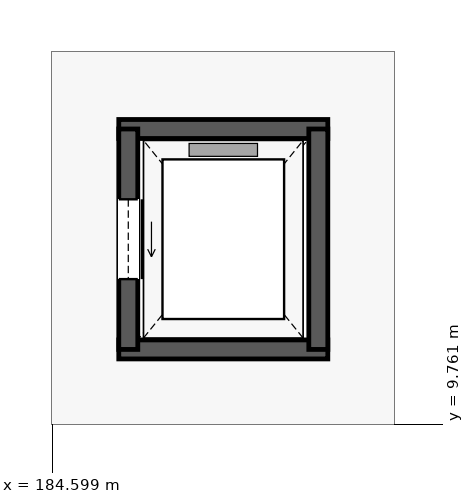
"""IFC4 building model, lengths in metres.
Left out: names, types, materials, properties, quantities, classifications, styles, units other than length and angle.
Written with IfcOpenShell. Run it as: python <this file> out.ifc"""

import sys

from ifc_helpers import new_model, si_unit, direction, frame, frame_2d, origin, place, context, subcontext, project, spatial, rectangle, extrude, element, fill, save


model = new_model("IFC4")
c1 = context("Model", 3, precision=1e-05, world=origin(), true_north=direction((0.0, 1.0)))
c2 = subcontext(c1, "Body", "Model", "MODEL_VIEW")
j1 = project(units=[si_unit("LENGTHUNIT", "METRE"), si_unit("PLANEANGLEUNIT", "RADIAN")], contexts=[c1])
p1 = place(None, origin())
s1 = spatial("IfcSite", under=j1, at=p1, CompositionType="ELEMENT")
p2 = place(p1, origin())
s2 = spatial("IfcBuilding", under=s1, at=p2, CompositionType="ELEMENT")
p3 = place(p2, frame((0.0, 0.0, 19.8)))
s3 = spatial("IfcBuildingStorey", under=s2, at=p3, CompositionType="ELEMENT", Elevation=19.8)
for number, where, z_axis, x_axis in (
    (1, (185.475, 10.75, 0.0), (0.0, 0.0, 1.0), (1.0, 0.0, 0.0)),
    (2, (188.225, 13.65, 0.0), (0.0, 0.0, 1.0), (-1.0, 0.0, 0.0)),
):
    element("IfcWall", number, at=place(p3, frame(where, z_axis=z_axis, x_axis=x_axis)), inside=s3, PredefinedType="SHEAR", context=c2, shape_type="SweptSolid", body=[
        extrude(rectangle(XDim=2.75, YDim=0.25, at=frame_2d((1.375, 0.0))), origin(), (0.0, 0.0, 1.0), 4.5),
    ])
p4 = place(p3, frame((185.6, 13.65, 0.0), z_axis=(0.0, 0.0, 1.0), x_axis=(0.0, -1.0, 0.0)))
e3 = element("IfcWall", 3, at=p4, inside=s3, PredefinedType="SHEAR", context=c2, shape_type="SweptSolid", body=[
    extrude(rectangle(XDim=2.9, YDim=0.25, at=frame_2d((1.45, 0.0))), origin(), (0.0, 0.0, 1.0), 4.5),
])
p5 = place(p4, frame((0.925, 0.0, 0.0)))
e4 = element("IfcOpeningElement", 4, at=p5, cuts=e3, PredefinedType="OPENING", context=c2, shape_type="SweptSolid", body=[
    extrude(rectangle(XDim=1.05, YDim=2.15, at=frame_2d((0.525, 1.075))), frame((0.0, 0.135, 0.0), z_axis=(0.0, -1.0, 0.0), x_axis=(1.0, 0.0, 0.0)), (0.0, 0.0, 1.0), 0.27),
])
p6 = place(p3, frame((188.1, 10.75, 0.0), z_axis=(0.0, 0.0, 1.0), x_axis=(0.0, 1.0, 0.0)))
e5 = element("IfcWall", 5, at=p6, inside=s3, PredefinedType="SHEAR", context=c2, shape_type="SweptSolid", body=[
    extrude(rectangle(XDim=2.9, YDim=0.25, at=frame_2d((1.45, 0.0))), origin(), (0.0, 0.0, 1.0), 4.5),
])
p7 = place(p5, origin())
e6 = element("IfcDoor", 6, at=p7, inside=s3, OperationType="SLIDING_TO_LEFT", PredefinedType="DOOR", context=c2, shape_type="SweptSolid", body=[
    extrude(rectangle(XDim=1.05, YDim=2.15, at=frame_2d((0.525, 1.075))), frame((0.0, 0.025, 0.0), z_axis=(0.0, -1.0, 0.0), x_axis=(1.0, 0.0, 0.0)), (0.0, 0.0, 1.0), 0.05),
])
fill(e4, e6)
save(model, sys.argv[1])
